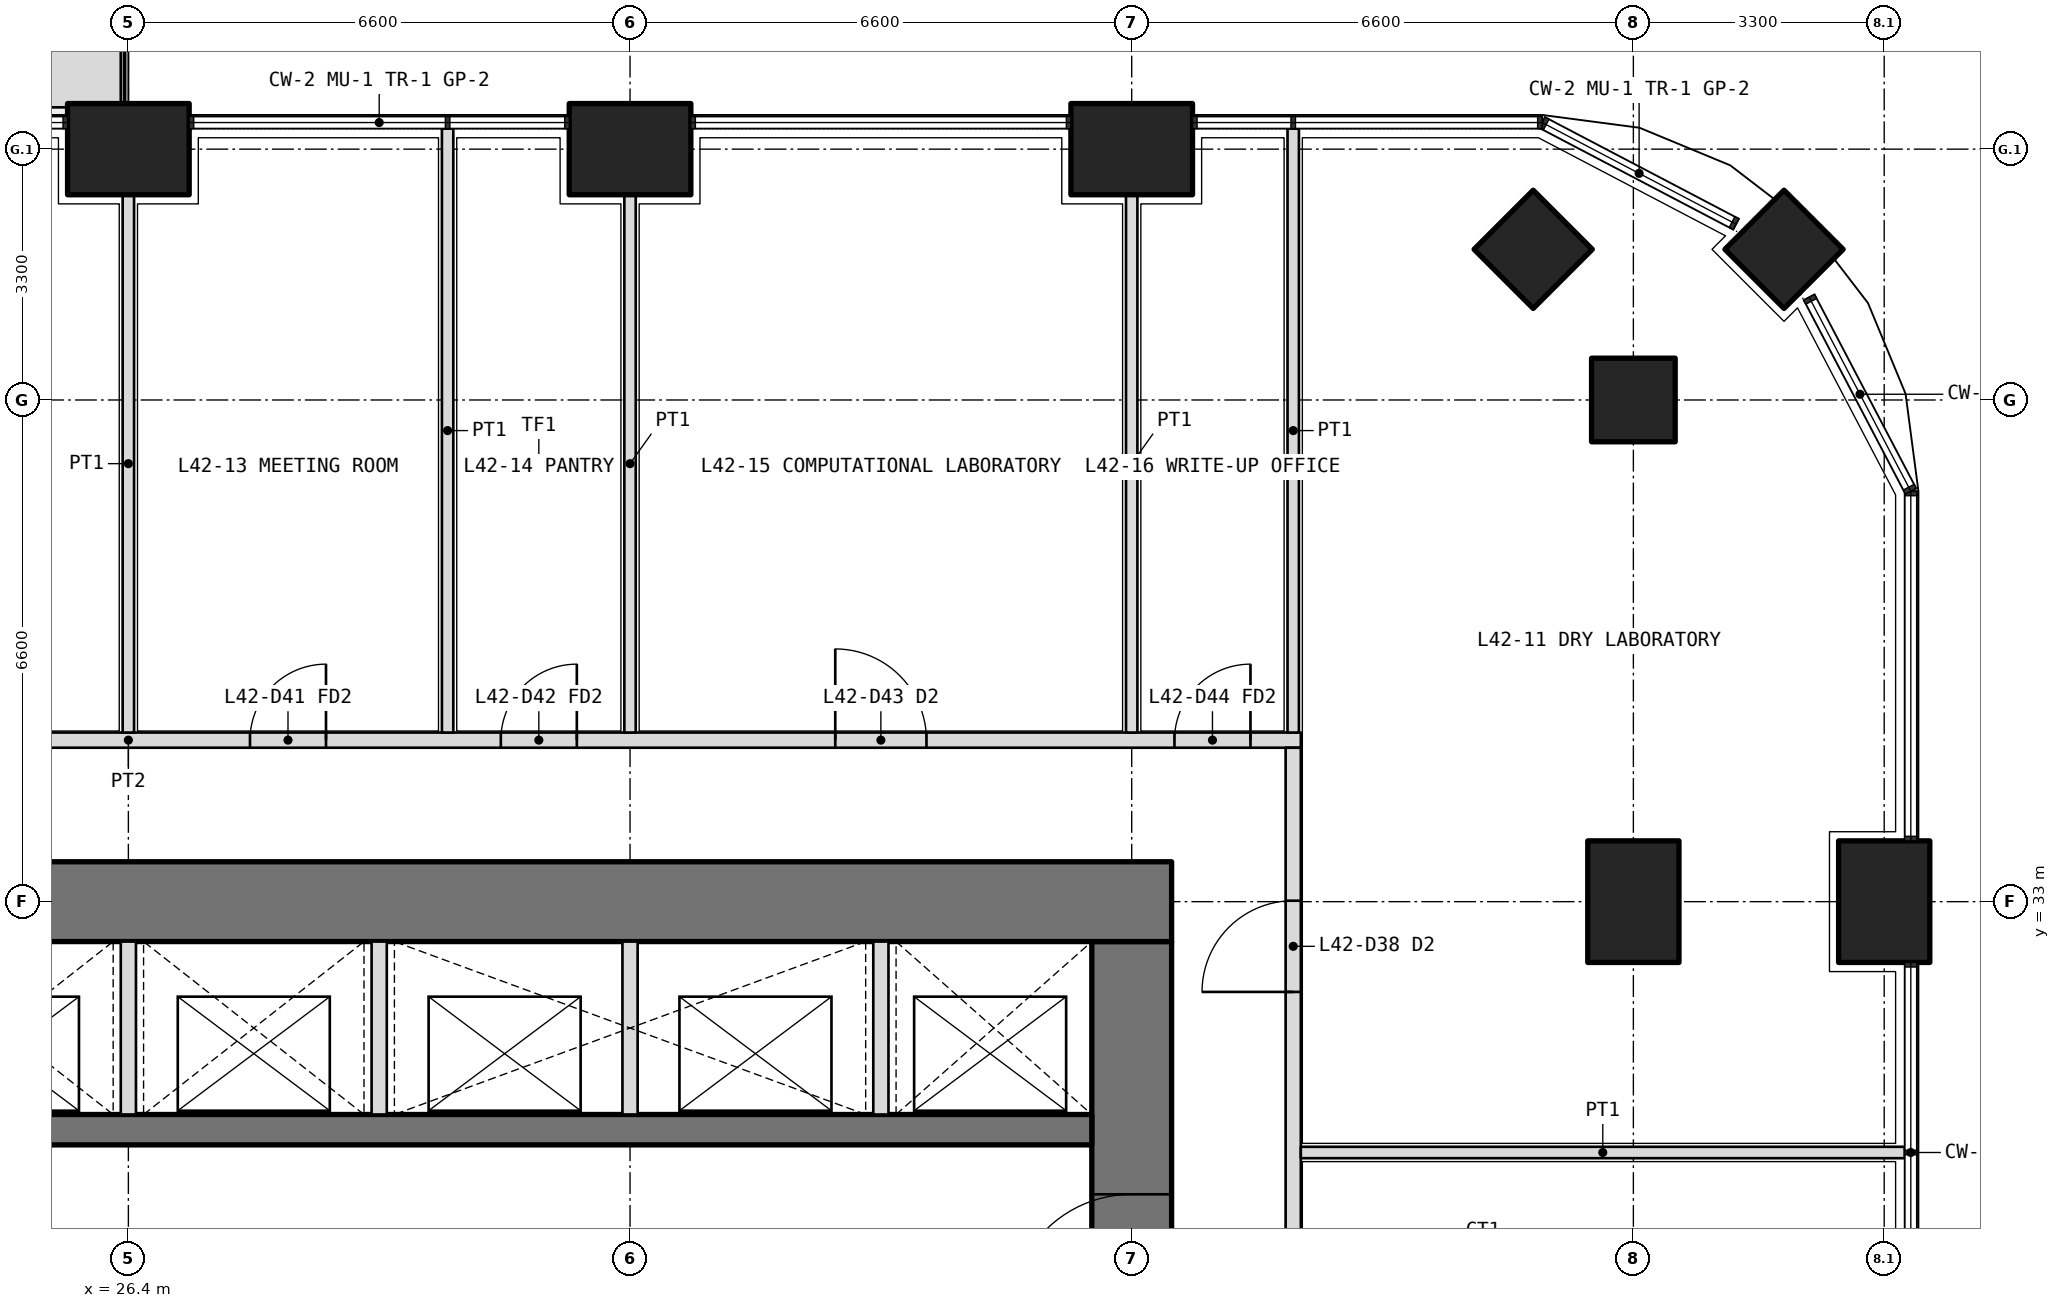
"""IFC4 building model, lengths in metres.
Left out: names, types, materials, properties, quantities, classifications, styles, units other than length and angle.
Written with IfcOpenShell. Run it as: python <this file> out.ifc"""

import sys

from ifc_helpers import new_model, si_unit, direction, frame, frame_2d, origin, origin_2d, place, context, subcontext, project, spatial, polyline, rectangle, outline, extrude, element, fill, save


model = new_model("IFC4")
c1 = context("Model", 3, precision=1e-05, world=origin(), true_north=direction((0.0, 1.0)))
c2 = subcontext(c1, "Body", "Model", "MODEL_VIEW")
j1 = project(units=[si_unit("LENGTHUNIT", "METRE"), si_unit("PLANEANGLEUNIT", "RADIAN")], contexts=[c1])
p1 = place(None, origin())
s1 = spatial("IfcSite", under=j1, at=p1, CompositionType="ELEMENT")
p2 = place(p1, origin())
s2 = spatial("IfcBuilding", under=s1, at=p2, CompositionType="ELEMENT")
p3 = place(p2, frame((0.0, 0.0, 185.1)))
s3 = spatial("IfcBuildingStorey", under=s2, at=p3, CompositionType="ELEMENT", Elevation=185.1)
p4 = place(p3, frame((48.182, 41.582, 0.0), z_axis=(0.0, 0.0, 1.0), x_axis=(0.707106781187, 0.707106781187, 0.0)))
e1 = element("IfcColumn", 1, at=p4, inside=s3, PredefinedType="COLUMN", context=c2, shape_type="SweptSolid", body=[
    extrude(rectangle(XDim=1.1, YDim=1.1, at=origin_2d()), origin(), (0.0, 0.0, 1.0), 4.2),
])
for number, where, z_axis, x_axis in (
    (2, (49.5, 33.0, 0.0), (0.0, 0.0, 1.0), (0.0, 1.0, 0.0)),
    (3, (26.4, 42.9, 0.0), (0.0, 0.0, 1.0), (1.0, 0.0, 0.0)),
    (4, (33.0, 42.9, 0.0), (0.0, 0.0, 1.0), (1.0, 0.0, 0.0)),
    (5, (39.6, 42.9, 0.0), (0.0, 0.0, 1.0), (1.0, 0.0, 0.0)),
):
    element("IfcColumn", number, at=place(p3, frame(where, z_axis=z_axis, x_axis=x_axis)), inside=s3, PredefinedType="COLUMN", context=c2, shape_type="SweptSolid", body=[
        extrude(rectangle(XDim=1.6, YDim=1.2, at=origin_2d()), origin(), (0.0, 0.0, 1.0), 4.2),
    ])
for number, where, z_axis, x_axis in (
    (6, (46.2, 39.6, 0.0), (0.0, 0.0, 1.0), (1.0, 0.0, 0.0)),
    (7, (44.882, 41.582, 0.0), (0.0, 0.0, 1.0), (0.707, 0.707, 0.0)),
):
    element("IfcColumn", number, at=place(p3, frame(where, z_axis=z_axis, x_axis=x_axis)), inside=s3, PredefinedType="COLUMN", context=c2, shape_type="SweptSolid", body=[
        extrude(rectangle(XDim=1.1, YDim=1.1, at=origin_2d()), origin(), (0.0, 0.0, 1.0), 4.2),
    ])
p5 = place(p3, frame((46.2, 33.0, 0.0), z_axis=(0.0, 0.0, 1.0), x_axis=(0.0, 1.0, 0.0)))
e8 = element("IfcColumn", 8, at=p5, inside=s3, PredefinedType="COLUMN", context=c2, shape_type="SweptSolid", body=[
    extrude(rectangle(XDim=1.6, YDim=1.2, at=origin_2d()), origin(), (0.0, 0.0, 1.0), 4.2),
])
p6 = place(p3, origin())
e9 = element("IfcWall", 9, at=p6, inside=s3, PredefinedType="USERDEFINED", context=c2, shape_type="SweptSolid", body=[
    extrude(outline(polyline([(17.25, 43.45), (26.3, 43.45), (26.3, 44.45), (17.25, 44.45), (17.25, 43.45)]), holes=[polyline([(17.4, 43.6), (26.15, 43.6), (26.15, 44.3), (17.4, 44.3), (17.4, 43.6)])]), origin(), (0.0, 0.0, 1.0), 1.05),
])
p7 = place(p3, frame((39.6, 13.725, 0.0), z_axis=(0.0, 0.0, 1.0), x_axis=(0.0, 1.0, 0.0)))
e10 = element("IfcWall", 10, at=p7, inside=s3, PredefinedType="SHEAR", context=c2, shape_type="SweptSolid", body=[
    extrude(rectangle(XDim=18.75, YDim=1.05, at=frame_2d((9.375, 0.0))), origin(), (0.0, 0.0, 1.0), 4.2),
])
p8 = place(p7, frame((3.025, 0.0, 0.0)))
e11 = element("IfcOpeningElement", 11, at=p8, cuts=e10, PredefinedType="OPENING", context=c2, shape_type="SweptSolid", body=[
    extrude(rectangle(XDim=1.6, YDim=2.1, at=frame_2d((0.8, 1.05))), frame((0.0, 0.535, 0.0), z_axis=(0.0, -1.0, 0.0), x_axis=(1.0, 0.0, 0.0)), (0.0, 0.0, 1.0), 1.07),
])
p9 = place(p7, frame((13.825, 0.0, 0.0)))
e12 = element("IfcOpeningElement", 12, at=p9, cuts=e10, PredefinedType="OPENING", context=c2, shape_type="SweptSolid", body=[
    extrude(rectangle(XDim=1.6, YDim=2.1, at=frame_2d((0.8, 1.05))), frame((0.0, 0.535, 0.0), z_axis=(0.0, -1.0, 0.0), x_axis=(1.0, 0.0, 0.0)), (0.0, 0.0, 1.0), 1.07),
])
p10 = place(p3, frame((40.125, 33.0, 0.0), z_axis=(0.0, 0.0, 1.0), x_axis=(-1.0, 0.0, 0.0)))
e13 = element("IfcWall", 13, at=p10, inside=s3, PredefinedType="SHEAR", context=c2, shape_type="SweptSolid", body=[
    extrude(rectangle(XDim=27.45, YDim=1.05, at=frame_2d((13.725, 0.0))), origin(), (0.0, 0.0, 1.0), 4.2),
])
p11 = place(p3, frame((13.725, 30.0, 0.0), z_axis=(0.0, 0.0, 1.0), x_axis=(1.0, 0.0, 0.0)))
e14 = element("IfcWall", 14, at=p11, inside=s3, PredefinedType="SHEAR", context=c2, shape_type="SweptSolid", body=[
    extrude(rectangle(XDim=25.35, YDim=0.4, at=frame_2d((12.675, 0.0))), origin(), (0.0, 0.0, 1.0), 4.2),
])
p12 = place(p11, frame((0.788, 0.0, 0.0)))
e15 = element("IfcOpeningElement", 15, at=p12, cuts=e14, PredefinedType="OPENING", context=c2, shape_type="SweptSolid", body=[
    extrude(rectangle(XDim=1.1, YDim=2.1, at=frame_2d((0.55, 1.05))), frame((0.0, 0.21, 0.0), z_axis=(0.0, -1.0, 0.0), x_axis=(1.0, 0.0, 0.0)), (0.0, 0.0, 1.0), 0.42),
])
p13 = place(p11, frame((3.875, 0.0, 0.0)))
e16 = element("IfcOpeningElement", 16, at=p13, cuts=e14, PredefinedType="OPENING", context=c2, shape_type="SweptSolid", body=[
    extrude(rectangle(XDim=1.1, YDim=2.1, at=frame_2d((0.55, 1.05))), frame((0.0, 0.21, 0.0), z_axis=(0.0, -1.0, 0.0), x_axis=(1.0, 0.0, 0.0)), (0.0, 0.0, 1.0), 0.42),
])
p14 = place(p11, frame((7.175, 0.0, 0.0)))
e17 = element("IfcOpeningElement", 17, at=p14, cuts=e14, PredefinedType="OPENING", context=c2, shape_type="SweptSolid", body=[
    extrude(rectangle(XDim=1.1, YDim=2.1, at=frame_2d((0.55, 1.05))), frame((0.0, 0.21, 0.0), z_axis=(0.0, -1.0, 0.0), x_axis=(1.0, 0.0, 0.0)), (0.0, 0.0, 1.0), 0.42),
])
p15 = place(p11, frame((10.475, 0.0, 0.0)))
e18 = element("IfcOpeningElement", 18, at=p15, cuts=e14, PredefinedType="OPENING", context=c2, shape_type="SweptSolid", body=[
    extrude(rectangle(XDim=1.1, YDim=2.1, at=frame_2d((0.55, 1.05))), frame((0.0, 0.21, 0.0), z_axis=(0.0, -1.0, 0.0), x_axis=(1.0, 0.0, 0.0)), (0.0, 0.0, 1.0), 0.42),
])
for number, where, z_axis, x_axis in (
    (19, (26.4, 30.2, 0.0), (0.0, 0.0, 1.0), (0.0, 1.0, 0.0)),
    (20, (29.7, 30.2, 0.0), (0.0, 0.0, 1.0), (0.0, 1.0, 0.0)),
    (21, (33.0, 30.2, 0.0), (0.0, 0.0, 1.0), (0.0, 1.0, 0.0)),
    (22, (36.3, 30.2, 0.0), (0.0, 0.0, 1.0), (0.0, 1.0, 0.0)),
):
    element("IfcWall", number, at=place(p3, frame(where, z_axis=z_axis, x_axis=x_axis)), inside=s3, PredefinedType="PARTITIONING", context=c2, shape_type="SweptSolid", body=[
        extrude(rectangle(XDim=2.275, YDim=0.2, at=frame_2d((1.138, 0.0))), origin(), (0.0, 0.0, 1.0), 4.2),
    ])
p16 = place(p3, frame((10.975, 35.125, 0.0), z_axis=(0.0, 0.0, 1.0), x_axis=(1.0, 0.0, 0.0)))
e23 = element("IfcWall", 23, at=p16, inside=s3, PredefinedType="PARTITIONING", context=c2, shape_type="SweptSolid", body=[
    extrude(rectangle(XDim=30.85, YDim=0.2, at=frame_2d((15.425, 0.0))), origin(), (0.0, 0.0, 1.0), 2.85),
])
p17 = place(p16, frame((7.262, 0.0, 0.0)))
e24 = element("IfcOpeningElement", 24, at=p17, cuts=e23, PredefinedType="OPENING", context=c2, shape_type="SweptSolid", body=[
    extrude(rectangle(XDim=1.0, YDim=2.1, at=frame_2d((0.5, 1.05))), frame((0.0, 0.11, 0.0), z_axis=(0.0, -1.0, 0.0), x_axis=(1.0, 0.0, 0.0)), (0.0, 0.0, 1.0), 0.22),
])
p18 = place(p16, frame((17.025, 0.0, 0.0)))
e25 = element("IfcOpeningElement", 25, at=p18, cuts=e23, PredefinedType="OPENING", context=c2, shape_type="SweptSolid", body=[
    extrude(rectangle(XDim=1.0, YDim=2.1, at=frame_2d((0.5, 1.05))), frame((0.0, 0.11, 0.0), z_axis=(0.0, -1.0, 0.0), x_axis=(1.0, 0.0, 0.0)), (0.0, 0.0, 1.0), 0.22),
])
p19 = place(p16, frame((20.325, 0.0, 0.0)))
e26 = element("IfcOpeningElement", 26, at=p19, cuts=e23, PredefinedType="OPENING", context=c2, shape_type="SweptSolid", body=[
    extrude(rectangle(XDim=1.0, YDim=2.1, at=frame_2d((0.5, 1.05))), frame((0.0, 0.11, 0.0), z_axis=(0.0, -1.0, 0.0), x_axis=(1.0, 0.0, 0.0)), (0.0, 0.0, 1.0), 0.22),
])
p20 = place(p16, frame((24.725, 0.0, 0.0)))
e27 = element("IfcOpeningElement", 27, at=p20, cuts=e23, PredefinedType="OPENING", context=c2, shape_type="SweptSolid", body=[
    extrude(rectangle(XDim=1.2, YDim=2.1, at=frame_2d((0.6, 1.05))), frame((0.0, 0.11, 0.0), z_axis=(0.0, -1.0, 0.0), x_axis=(1.0, 0.0, 0.0)), (0.0, 0.0, 1.0), 0.22),
])
p21 = place(p16, frame((29.188, 0.0, 0.0)))
e28 = element("IfcOpeningElement", 28, at=p21, cuts=e23, PredefinedType="OPENING", context=c2, shape_type="SweptSolid", body=[
    extrude(rectangle(XDim=1.0, YDim=2.1, at=frame_2d((0.5, 1.05))), frame((0.0, 0.11, 0.0), z_axis=(0.0, -1.0, 0.0), x_axis=(1.0, 0.0, 0.0)), (0.0, 0.0, 1.0), 0.22),
])
p22 = place(p3, frame((41.725, 11.175, 0.0), z_axis=(0.0, 0.0, 1.0), x_axis=(0.0, 1.0, 0.0)))
e29 = element("IfcWall", 29, at=p22, inside=s3, PredefinedType="PARTITIONING", context=c2, shape_type="SweptSolid", body=[
    extrude(rectangle(XDim=23.85, YDim=0.2, at=frame_2d((11.925, 0.0))), origin(), (0.0, 0.0, 1.0), 2.85),
])
p23 = place(p22, frame((2.012, 0.0, 0.0)))
e30 = element("IfcOpeningElement", 30, at=p23, cuts=e29, PredefinedType="OPENING", context=c2, shape_type="SweptSolid", body=[
    extrude(rectangle(XDim=1.2, YDim=2.1, at=frame_2d((0.6, 1.05))), frame((0.0, 0.11, 0.0), z_axis=(0.0, -1.0, 0.0), x_axis=(1.0, 0.0, 0.0)), (0.0, 0.0, 1.0), 0.22),
])
p24 = place(p22, frame((6.375, 0.0, 0.0)))
e31 = element("IfcOpeningElement", 31, at=p24, cuts=e29, PredefinedType="OPENING", context=c2, shape_type="SweptSolid", body=[
    extrude(rectangle(XDim=1.2, YDim=2.1, at=frame_2d((0.6, 1.05))), frame((0.0, 0.11, 0.0), z_axis=(0.0, -1.0, 0.0), x_axis=(1.0, 0.0, 0.0)), (0.0, 0.0, 1.0), 0.22),
])
p25 = place(p22, frame((9.625, 0.0, 0.0)))
e32 = element("IfcOpeningElement", 32, at=p25, cuts=e29, PredefinedType="OPENING", context=c2, shape_type="SweptSolid", body=[
    extrude(rectangle(XDim=1.0, YDim=2.1, at=frame_2d((0.5, 1.05))), frame((0.0, 0.11, 0.0), z_axis=(0.0, -1.0, 0.0), x_axis=(1.0, 0.0, 0.0)), (0.0, 0.0, 1.0), 0.22),
])
p26 = place(p22, frame((12.975, 0.0, 0.0)))
e33 = element("IfcOpeningElement", 33, at=p26, cuts=e29, PredefinedType="OPENING", context=c2, shape_type="SweptSolid", body=[
    extrude(rectangle(XDim=0.9, YDim=2.1, at=frame_2d((0.45, 1.05))), frame((0.0, 0.11, 0.0), z_axis=(0.0, -1.0, 0.0), x_axis=(1.0, 0.0, 0.0)), (0.0, 0.0, 1.0), 0.22),
])
p27 = place(p22, frame((16.375, 0.0, 0.0)))
e34 = element("IfcOpeningElement", 34, at=p27, cuts=e29, PredefinedType="OPENING", context=c2, shape_type="SweptSolid", body=[
    extrude(rectangle(XDim=1.0, YDim=2.1, at=frame_2d((0.5, 1.05))), frame((0.0, 0.11, 0.0), z_axis=(0.0, -1.0, 0.0), x_axis=(1.0, 0.0, 0.0)), (0.0, 0.0, 1.0), 0.22),
])
p28 = place(p22, frame((20.637, 0.0, 0.0)))
e35 = element("IfcOpeningElement", 35, at=p28, cuts=e29, PredefinedType="OPENING", context=c2, shape_type="SweptSolid", body=[
    extrude(rectangle(XDim=1.2, YDim=2.1, at=frame_2d((0.6, 1.05))), frame((0.0, 0.11, 0.0), z_axis=(0.0, -1.0, 0.0), x_axis=(1.0, 0.0, 0.0)), (0.0, 0.0, 1.0), 0.22),
])
p29 = place(p3, frame((41.725, 43.17, 0.0), z_axis=(0.0, 0.0, 1.0), x_axis=(0.0, -1.0, 0.0)))
e36 = element("IfcWall", 36, at=p29, inside=s3, PredefinedType="PARTITIONING", context=c2, shape_type="SweptSolid", body=[
    extrude(rectangle(XDim=7.945, YDim=0.15, at=frame_2d((3.972, 0.0))), origin(), (0.0, 0.0, 1.0), 2.7),
])
p30 = place(p3, frame((49.77, 29.7, 0.0), z_axis=(0.0, 0.0, 1.0), x_axis=(-1.0, 0.0, 0.0)))
e37 = element("IfcWall", 37, at=p30, inside=s3, PredefinedType="PARTITIONING", context=c2, shape_type="SweptSolid", body=[
    extrude(rectangle(XDim=7.945, YDim=0.15, at=frame_2d((3.973, 0.0))), origin(), (0.0, 0.0, 1.0), 2.7),
])
p31 = place(p3, frame((30.6, 43.17, 0.0), z_axis=(0.0, 0.0, 1.0), x_axis=(0.0, -1.0, 0.0)))
e38 = element("IfcWall", 38, at=p31, inside=s3, PredefinedType="PARTITIONING", context=c2, shape_type="SweptSolid", body=[
    extrude(rectangle(XDim=7.945, YDim=0.15, at=frame_2d((3.972, 0.0))), origin(), (0.0, 0.0, 1.0), 2.7),
])
for number, where, z_axis, x_axis in (
    (39, (33.0, 42.3, 0.0), (0.0, 0.0, 1.0), (0.0, -1.0, 0.0)),
    (40, (26.4, 42.3, 0.0), (0.0, 0.0, 1.0), (0.0, -1.0, 0.0)),
    (41, (39.6, 42.3, 0.0), (0.0, 0.0, 1.0), (0.0, -1.0, 0.0)),
):
    element("IfcWall", number, at=place(p3, frame(where, z_axis=z_axis, x_axis=x_axis)), inside=s3, PredefinedType="PARTITIONING", context=c2, shape_type="SweptSolid", body=[
        extrude(rectangle(XDim=7.075, YDim=0.15, at=frame_2d((3.538, 0.0))), origin(), (0.0, 0.0, 1.0), 2.85),
    ])
p32 = place(p28, origin())
e42 = element("IfcDoor", 42, at=p32, inside=s3, OperationType="DOUBLE_DOOR_SINGLE_SWING", PredefinedType="DOOR", context=c2, shape_type="SweptSolid", body=[
    extrude(rectangle(XDim=1.2, YDim=2.1, at=frame_2d((0.6, 1.05))), frame((0.0, 0.025, 0.0), z_axis=(0.0, -1.0, 0.0), x_axis=(1.0, 0.0, 0.0)), (0.0, 0.0, 1.0), 0.05),
])
fill(e35, e42)
p33 = place(p18, origin())
e43 = element("IfcDoor", 43, at=p33, inside=s3, OperationType="SINGLE_SWING_RIGHT", PredefinedType="DOOR", context=c2, shape_type="SweptSolid", body=[
    extrude(rectangle(XDim=1.0, YDim=2.1, at=frame_2d((0.5, 1.05))), frame((0.0, 0.025, 0.0), z_axis=(0.0, -1.0, 0.0), x_axis=(1.0, 0.0, 0.0)), (0.0, 0.0, 1.0), 0.05),
])
fill(e25, e43)
p34 = place(p19, origin())
e44 = element("IfcDoor", 44, at=p34, inside=s3, OperationType="SINGLE_SWING_RIGHT", PredefinedType="DOOR", context=c2, shape_type="SweptSolid", body=[
    extrude(rectangle(XDim=1.0, YDim=2.1, at=frame_2d((0.5, 1.05))), frame((0.0, 0.025, 0.0), z_axis=(0.0, -1.0, 0.0), x_axis=(1.0, 0.0, 0.0)), (0.0, 0.0, 1.0), 0.05),
])
fill(e26, e44)
p35 = place(p20, origin())
e45 = element("IfcDoor", 45, at=p35, inside=s3, OperationType="DOUBLE_DOOR_SINGLE_SWING", PredefinedType="DOOR", context=c2, shape_type="SweptSolid", body=[
    extrude(rectangle(XDim=1.2, YDim=2.1, at=frame_2d((0.6, 1.05))), frame((0.0, 0.025, 0.0), z_axis=(0.0, -1.0, 0.0), x_axis=(1.0, 0.0, 0.0)), (0.0, 0.0, 1.0), 0.05),
])
fill(e27, e45)
p36 = place(p21, origin())
e46 = element("IfcDoor", 46, at=p36, inside=s3, OperationType="SINGLE_SWING_RIGHT", PredefinedType="DOOR", context=c2, shape_type="SweptSolid", body=[
    extrude(rectangle(XDim=1.0, YDim=2.1, at=frame_2d((0.5, 1.05))), frame((0.0, 0.025, 0.0), z_axis=(0.0, -1.0, 0.0), x_axis=(1.0, 0.0, 0.0)), (0.0, 0.0, 1.0), 0.05),
])
fill(e28, e46)
p37 = place(p9, origin())
e47 = element("IfcDoor", 47, at=p37, inside=s3, OperationType="DOUBLE_DOOR_DOUBLE_SWING", PredefinedType="DOOR", context=c2, shape_type="SweptSolid", body=[
    extrude(rectangle(XDim=1.6, YDim=2.1, at=frame_2d((0.8, 1.05))), frame((0.0, 0.025, 0.0), z_axis=(0.0, -1.0, 0.0), x_axis=(1.0, 0.0, 0.0)), (0.0, 0.0, 1.0), 0.05),
])
fill(e12, e47)
save(model, sys.argv[1])
